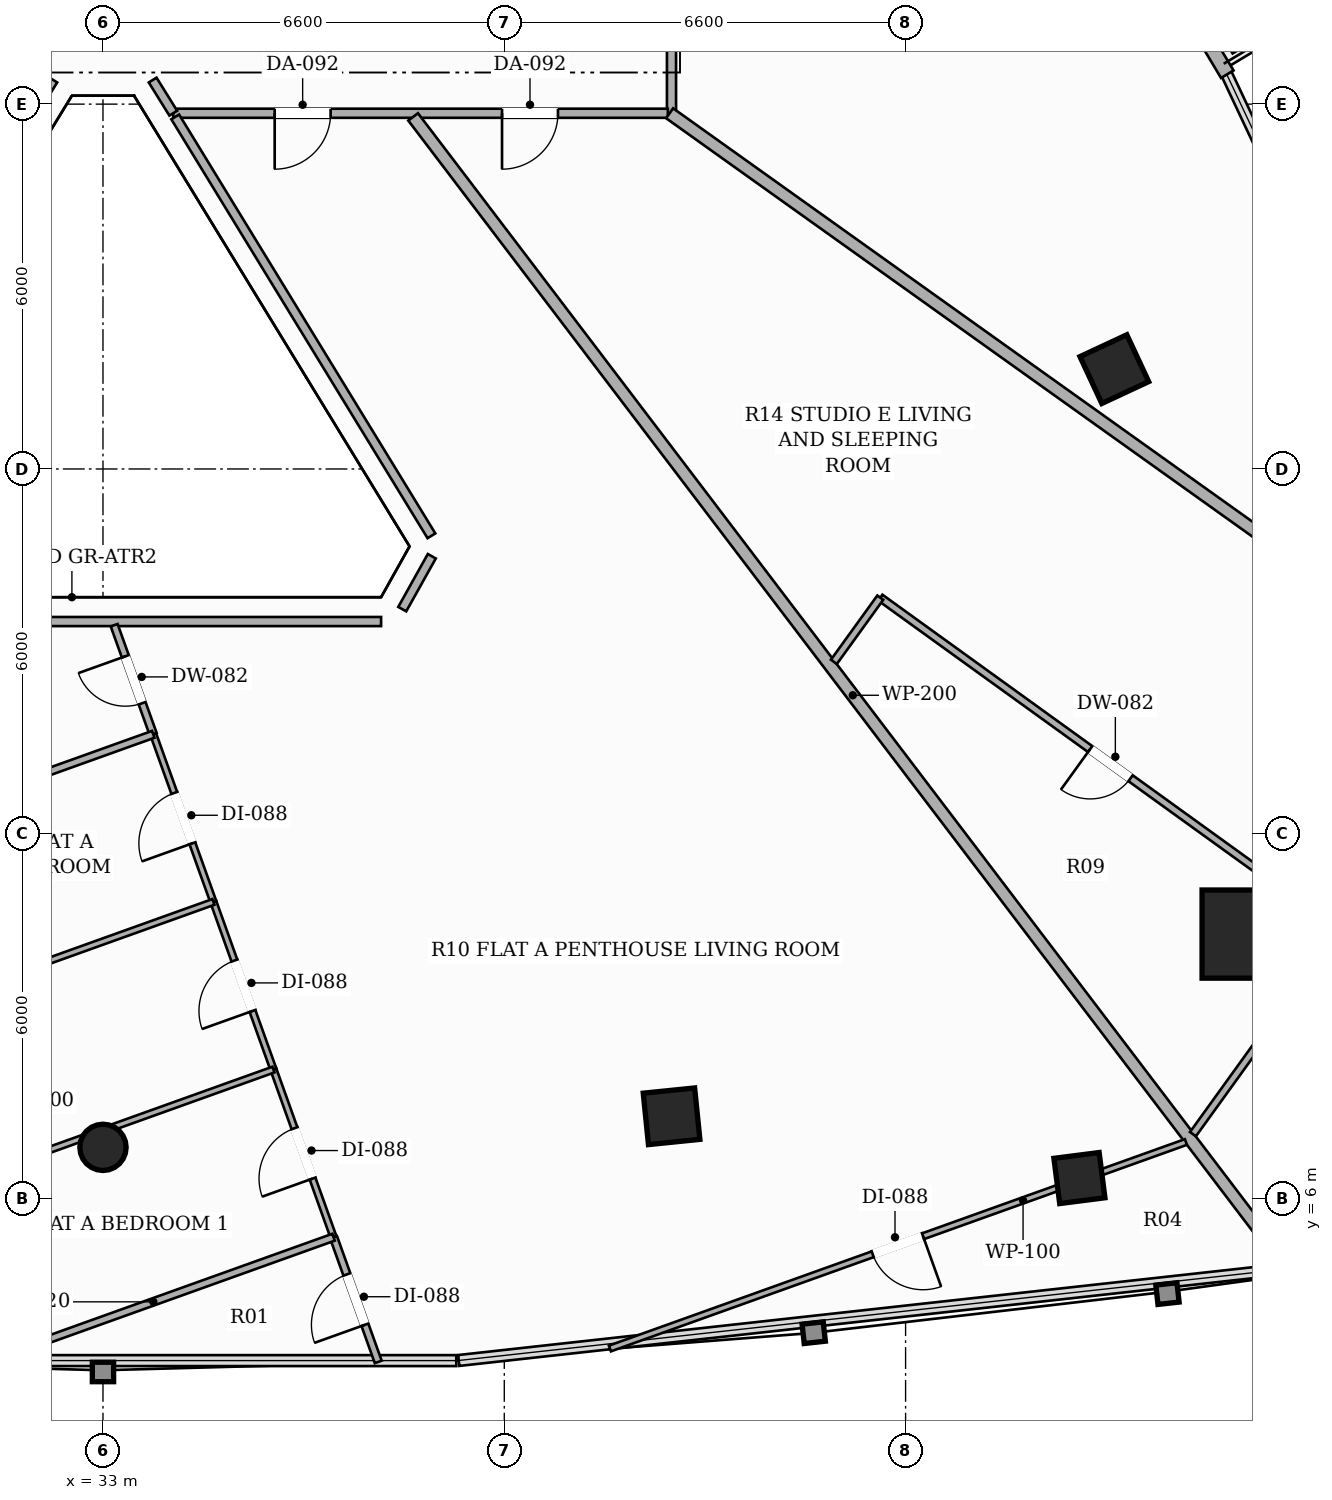
"""IFC4 building model, lengths in metres.
Left out: names, types, materials, properties, quantities, classifications, styles, units other than length and angle.
Written with IfcOpenShell. Run it as: python <this file> out.ifc"""

import sys

from ifc_helpers import new_model, si_unit, direction, frame, frame_2d, origin, origin_2d, place, context, subcontext, project, spatial, rectangle, hollow_rectangle, hollow_circle, extrude, element, fill, save


model = new_model("IFC4")
c1 = context("Model", 3, precision=1e-05, world=origin(), true_north=direction((0.0, 1.0)))
c2 = subcontext(c1, "Body", "Model", "MODEL_VIEW")
j1 = project(units=[si_unit("LENGTHUNIT", "METRE"), si_unit("PLANEANGLEUNIT", "RADIAN")], contexts=[c1])
p1 = place(None, origin())
s1 = spatial("IfcSite", under=j1, at=p1, CompositionType="ELEMENT")
p2 = place(p1, origin())
s2 = spatial("IfcBuilding", under=s1, at=p2, CompositionType="ELEMENT")
p3 = place(p2, frame((0.0, 0.0, 143.0)))
s3 = spatial("IfcBuildingStorey", under=s2, at=p3, CompositionType="ELEMENT", Elevation=143.0)
p4 = place(p3, frame((51.801, 10.351, 0.0), z_axis=(0.0, 0.0, 1.0), x_axis=(1.0, 0.0, 0.0)))
e1 = element("IfcColumn", 1, at=p4, inside=s3, PredefinedType="COLUMN", context=c2, shape_type="SweptSolid", body=[
    extrude(hollow_rectangle(XDim=1.45, YDim=1.45, WallThickness=0.045, at=origin_2d()), origin(), (0.0, 0.0, 1.0), 3.3),
])
p5 = place(p3, frame((33.0, 6.844, 0.0), z_axis=(0.0, 0.0, 1.0), x_axis=(1.0, 0.0, 0.0)))
e2 = element("IfcColumn", 2, at=p5, inside=s3, PredefinedType="COLUMN", context=c2, shape_type="SweptSolid", body=[
    extrude(hollow_circle(Radius=0.381, WallThickness=0.022, at=origin_2d()), origin(), (0.0, 0.0, 1.0), 3.3),
])
for number, where, z_axis, x_axis in (
    (3, (42.351, 7.355, 0.0), (0.0, 0.0, 1.0), (0.995, 0.101, 0.0)),
    (4, (49.633, 19.642, 0.0), (0.0, 0.0, 1.0), (-0.423, 0.906, 0.0)),
):
    element("IfcColumn", number, at=place(p3, frame(where, z_axis=z_axis, x_axis=x_axis)), inside=s3, PredefinedType="COLUMN", context=c2, shape_type="SweptSolid", body=[
        extrude(hollow_rectangle(XDim=0.85, YDim=0.85, WallThickness=0.028, at=origin_2d()), origin(), (0.0, 0.0, 1.0), 3.3),
    ])
p6 = place(p3, frame((49.059, 6.339, 0.0), z_axis=(0.0, 0.0, 1.0), x_axis=(0.99189444259, 0.127064608601, 0.0)))
e5 = element("IfcColumn", 5, at=p6, inside=s3, PredefinedType="COLUMN", context=c2, shape_type="SweptSolid", body=[
    extrude(hollow_rectangle(XDim=0.75, YDim=0.75, WallThickness=0.025, at=origin_2d()), origin(), (0.0, 0.0, 1.0), 3.3),
])
p7 = place(p3, frame((51.491, 24.492, 0.0), z_axis=(0.0, 0.0, 1.0), x_axis=(-0.514364263751, 0.857571807009, 0.0)))
e6 = element("IfcWall", 6, at=p7, inside=s3, PredefinedType="SOLIDWALL", context=c2, shape_type="SweptSolid", body=[
    extrude(rectangle(XDim=11.468, YDim=0.24, at=frame_2d((5.734, 0.0))), origin(), (0.0, 0.0, 1.0), 2.584),
])
p8 = place(p7, frame((8.972, 0.0, 0.0)))
e7 = element("IfcOpeningElement", 7, at=p8, cuts=e6, PredefinedType="OPENING", context=c2, shape_type="SweptSolid", body=[
    extrude(rectangle(XDim=1.8, YDim=2.2, at=frame_2d((0.9, 1.1))), frame((0.0, 0.13, 0.0), z_axis=(0.0, -1.0, 0.0), x_axis=(1.0, 0.0, 0.0)), (0.0, 0.0, 1.0), 0.26),
])
p9 = place(p3, frame((32.183, 24.396, 0.0), z_axis=(0.0, 0.0, 1.0), x_axis=(-0.527674894897, -0.849446411079, 0.0)))
e8 = element("IfcWall", 8, at=p9, inside=s3, PredefinedType="PARTITIONING", context=c2, shape_type="SweptSolid", body=[
    extrude(rectangle(XDim=0.643, YDim=0.15, at=frame_2d((0.321, 0.0))), origin(), (0.0, 0.0, 1.0), 3.02),
])
p10 = place(p3, frame((42.35, 28.34, 0.0), z_axis=(0.0, 0.0, 1.0), x_axis=(0.0, -1.0, 0.0)))
e9 = element("IfcWall", 9, at=p10, inside=s3, PredefinedType="PARTITIONING", context=c2, shape_type="SweptSolid", body=[
    extrude(rectangle(XDim=4.49, YDim=0.15, at=frame_2d((2.245, 0.0))), origin(), (0.0, 0.0, 1.0), 2.681),
])
p11 = place(p10, frame((1.805, 0.0, 0.0)))
e10 = element("IfcOpeningElement", 10, at=p11, cuts=e9, PredefinedType="OPENING", context=c2, shape_type="SweptSolid", body=[
    extrude(rectangle(XDim=0.88, YDim=2.1, at=frame_2d((0.44, 1.05))), frame((0.0, 0.085, 0.0), z_axis=(0.0, -1.0, 0.0), x_axis=(1.0, 0.0, 0.0)), (0.0, 0.0, 1.0), 0.17),
])
p12 = place(p3, frame((42.29, 23.85, 0.0), z_axis=(0.0, 0.0, 1.0), x_axis=(-1.0, 0.0, 0.0)))
e11 = element("IfcWall", 11, at=p12, inside=s3, PredefinedType="PARTITIONING", context=c2, shape_type="SweptSolid", body=[
    extrude(rectangle(XDim=8.134, YDim=0.15, at=frame_2d((4.067, 0.0))), origin(), (0.0, 0.0, 1.0), 2.452),
])
p13 = place(p12, frame((5.546, 0.0, 0.0)))
e12 = element("IfcOpeningElement", 12, at=p13, cuts=e11, PredefinedType="OPENING", context=c2, shape_type="SweptSolid", body=[
    extrude(rectangle(XDim=0.92, YDim=2.15, at=frame_2d((0.46, 1.075))), frame((0.0, 0.085, 0.0), z_axis=(0.0, -1.0, 0.0), x_axis=(1.0, 0.0, 0.0)), (0.0, 0.0, 1.0), 0.17),
])
p14 = place(p12, frame((1.807, 0.0, 0.0)))
e13 = element("IfcOpeningElement", 13, at=p14, cuts=e11, PredefinedType="OPENING", context=c2, shape_type="SweptSolid", body=[
    extrude(rectangle(XDim=0.92, YDim=2.15, at=frame_2d((0.46, 1.075))), frame((0.0, 0.085, 0.0), z_axis=(0.0, -1.0, 0.0), x_axis=(1.0, 0.0, 0.0)), (0.0, 0.0, 1.0), 0.17),
])
p15 = place(p3, frame((34.156, 23.851, 0.0), z_axis=(0.0, 0.0, 1.0), x_axis=(-0.528356729584, 0.849022476913, 0.0)))
e14 = element("IfcWall", 14, at=p15, inside=s3, PredefinedType="PARTITIONING", context=c2, shape_type="SweptSolid", body=[
    extrude(rectangle(XDim=0.642, YDim=0.15, at=frame_2d((0.321, 0.0))), origin(), (0.0, 0.0, 1.0), 3.02),
])
p16 = place(p3, frame((34.188, 23.79, 0.0), z_axis=(0.0, 0.0, 1.0), x_axis=(0.521816809014, -0.853057570057, 0.0)))
e15 = element("IfcWall", 15, at=p16, inside=s3, PredefinedType="PARTITIONING", context=c2, shape_type="SweptSolid", body=[
    extrude(rectangle(XDim=8.076, YDim=0.15, at=frame_2d((4.038, 0.0))), origin(), (0.0, 0.0, 1.0), 2.681),
])
p17 = place(p3, frame((38.408, 16.565, 0.0), z_axis=(0.0, 0.0, 1.0), x_axis=(-0.48761814532, -0.873057010942, 0.0)))
e16 = element("IfcWall", 16, at=p17, inside=s3, PredefinedType="PARTITIONING", context=c2, shape_type="SweptSolid", body=[
    extrude(rectangle(XDim=0.996, YDim=0.15, at=frame_2d((0.498, 0.0))), origin(), (0.0, 0.0, 1.0), 3.02),
])
p18 = place(p3, frame((37.574, 15.491, 0.0), z_axis=(0.0, 0.0, 1.0), x_axis=(-1.0, 0.0, 0.0)))
e17 = element("IfcWall", 17, at=p18, inside=s3, PredefinedType="PARTITIONING", context=c2, shape_type="SweptSolid", body=[
    extrude(rectangle(XDim=9.148, YDim=0.15, at=frame_2d((4.574, 0.0))), origin(), (0.0, 0.0, 1.0), 2.681),
])
p19 = place(p3, frame((38.101, 23.79, 0.0), z_axis=(0.0, 0.0, 1.0), x_axis=(0.605201904092, -0.796072016393, 0.0)))
e18 = element("IfcWall", 18, at=p19, inside=s3, PredefinedType="PARTITIONING", context=c2, shape_type="SweptSolid", body=[
    extrude(rectangle(XDim=23.896, YDim=0.2, at=frame_2d((11.948, 0.0))), origin(), (0.0, 0.0, 1.0), 2.373),
])
p20 = place(p3, frame((56.515, 13.72, 0.0), z_axis=(0.0, 0.0, 1.0), x_axis=(-0.813997291107, 0.580868668522, 0.0)))
e19 = element("IfcWall", 19, at=p20, inside=s3, PredefinedType="PARTITIONING", context=c2, shape_type="SweptSolid", body=[
    extrude(rectangle(XDim=17.44, YDim=0.2, at=frame_2d((8.72, 0.0))), origin(), (0.0, 0.0, 1.0), 2.373),
])
p21 = place(p3, frame((33.827, 13.636, 0.0), z_axis=(0.0, 0.0, 1.0), x_axis=(-0.337163686904, 0.941446041063, 0.0)))
e20 = element("IfcWall", 20, at=p21, inside=s3, PredefinedType="PARTITIONING", context=c2, shape_type="SweptSolid", body=[
    extrude(rectangle(XDim=1.906, YDim=0.12, at=frame_2d((0.953, 0.0))), origin(), (0.0, 0.0, 1.0), 2.681),
])
p22 = place(p21, frame((0.543, 0.0, 0.0)))
e21 = element("IfcOpeningElement", 21, at=p22, cuts=e20, PredefinedType="OPENING", context=c2, shape_type="SweptSolid", body=[
    extrude(rectangle(XDim=0.82, YDim=2.1, at=frame_2d((0.41, 1.05))), frame((0.0, 0.07, 0.0), z_axis=(0.0, -1.0, 0.0), x_axis=(1.0, 0.0, 0.0)), (0.0, 0.0, 1.0), 0.14),
])
p23 = place(p3, frame((37.527, 3.315, 0.0), z_axis=(0.0, 0.0, 1.0), x_axis=(-0.337393850622, 0.9413635799, 0.0)))
e22 = element("IfcWall", 22, at=p23, inside=s3, PredefinedType="PARTITIONING", context=c2, shape_type="SweptSolid", body=[
    extrude(rectangle(XDim=2.179, YDim=0.12, at=frame_2d((1.089, 0.0))), origin(), (0.0, 0.0, 1.0), 3.02),
])
p24 = place(p23, frame((0.649, 0.0, 0.0)))
e23 = element("IfcOpeningElement", 23, at=p24, cuts=e22, PredefinedType="OPENING", context=c2, shape_type="SweptSolid", body=[
    extrude(rectangle(XDim=0.88, YDim=2.1, at=frame_2d((0.44, 1.05))), frame((0.0, 0.07, 0.0), z_axis=(0.0, -1.0, 0.0), x_axis=(1.0, 0.0, 0.0)), (0.0, 0.0, 1.0), 0.14),
])
p25 = place(p3, frame((36.792, 5.366, 0.0), z_axis=(0.0, 0.0, 1.0), x_axis=(-0.33735537207, 0.941377370099, 0.0)))
e24 = element("IfcWall", 24, at=p25, inside=s3, PredefinedType="PARTITIONING", context=c2, shape_type="SweptSolid", body=[
    extrude(rectangle(XDim=2.929, YDim=0.1, at=frame_2d((1.464, 0.0))), origin(), (0.0, 0.0, 1.0), 2.373),
])
p26 = place(p25, frame((1.024, 0.0, 0.0)))
e25 = element("IfcOpeningElement", 25, at=p26, cuts=e24, PredefinedType="OPENING", context=c2, shape_type="SweptSolid", body=[
    extrude(rectangle(XDim=0.88, YDim=2.1, at=frame_2d((0.44, 1.05))), frame((0.0, 0.06, 0.0), z_axis=(0.0, -1.0, 0.0), x_axis=(1.0, 0.0, 0.0)), (0.0, 0.0, 1.0), 0.12),
])
p27 = place(p3, frame((50.81, 6.932, 0.0), z_axis=(0.0, 0.0, 1.0), x_axis=(-0.941340567411, -0.337458050943, 0.0)))
e26 = element("IfcWall", 26, at=p27, inside=s3, PredefinedType="PARTITIONING", context=c2, shape_type="SweptSolid", body=[
    extrude(rectangle(XDim=10.063, YDim=0.1, at=frame_2d((5.032, 0.0))), origin(), (0.0, 0.0, 1.0), 2.373),
])
p28 = place(p27, frame((4.592, 0.0, 0.0)))
e27 = element("IfcOpeningElement", 27, at=p28, cuts=e26, PredefinedType="OPENING", context=c2, shape_type="SweptSolid", body=[
    extrude(rectangle(XDim=0.88, YDim=2.1, at=frame_2d((0.44, 1.05))), frame((0.0, 0.06, 0.0), z_axis=(0.0, -1.0, 0.0), x_axis=(1.0, 0.0, 0.0)), (0.0, 0.0, 1.0), 0.12),
])
p29 = place(p3, frame((35.804, 8.123, 0.0), z_axis=(0.0, 0.0, 1.0), x_axis=(-0.337381847176, 0.941367881965, 0.0)))
e28 = element("IfcWall", 28, at=p29, inside=s3, PredefinedType="PARTITIONING", context=c2, shape_type="SweptSolid", body=[
    extrude(rectangle(XDim=2.928, YDim=0.1, at=frame_2d((1.464, 0.0))), origin(), (0.0, 0.0, 1.0), 3.02),
])
p30 = place(p29, frame((1.024, 0.0, 0.0)))
e29 = element("IfcOpeningElement", 29, at=p30, cuts=e28, PredefinedType="OPENING", context=c2, shape_type="SweptSolid", body=[
    extrude(rectangle(XDim=0.88, YDim=2.1, at=frame_2d((0.44, 1.05))), frame((0.0, 0.06, 0.0), z_axis=(0.0, -1.0, 0.0), x_axis=(1.0, 0.0, 0.0)), (0.0, 0.0, 1.0), 0.12),
])
p31 = place(p3, frame((34.816, 10.88, 0.0), z_axis=(0.0, 0.0, 1.0), x_axis=(-0.337756804272, 0.941233414817, 0.0)))
e30 = element("IfcWall", 30, at=p31, inside=s3, PredefinedType="PARTITIONING", context=c2, shape_type="SweptSolid", body=[
    extrude(rectangle(XDim=2.928, YDim=0.1, at=frame_2d((1.464, 0.0))), origin(), (0.0, 0.0, 1.0), 3.02),
])
p32 = place(p31, frame((1.024, 0.0, 0.0)))
e31 = element("IfcOpeningElement", 31, at=p32, cuts=e30, PredefinedType="OPENING", context=c2, shape_type="SweptSolid", body=[
    extrude(rectangle(XDim=0.88, YDim=2.1, at=frame_2d((0.44, 1.05))), frame((0.0, 0.06, 0.0), z_axis=(0.0, -1.0, 0.0), x_axis=(1.0, 0.0, 0.0)), (0.0, 0.0, 1.0), 0.12),
])
p33 = place(p3, frame((33.827, 13.636, 0.0), z_axis=(0.0, 0.0, 1.0), x_axis=(-0.941307932725, -0.337549071676, 0.0)))
e32 = element("IfcWall", 32, at=p33, inside=s3, PredefinedType="PARTITIONING", context=c2, shape_type="SweptSolid", body=[
    extrude(rectangle(XDim=4.743, YDim=0.12, at=frame_2d((2.372, 0.0))), origin(), (0.0, 0.0, 1.0), 2.681),
])
p34 = place(p3, frame((30.865, 3.241, 0.0), z_axis=(0.0, 0.0, 1.0), x_axis=(0.941328015911, 0.337493061354, 0.0)))
e33 = element("IfcWall", 33, at=p34, inside=s3, PredefinedType="PARTITIONING", context=c2, shape_type="SweptSolid", body=[
    extrude(rectangle(XDim=6.296, YDim=0.12, at=frame_2d((3.148, 0.0))), origin(), (0.0, 0.0, 1.0), 2.579),
])
p35 = place(p3, frame((28.008, 5.328, 0.0), z_axis=(0.0, 0.0, 1.0), x_axis=(0.941323677897, 0.337505160599, 0.0)))
e34 = element("IfcWall", 34, at=p35, inside=s3, PredefinedType="PARTITIONING", context=c2, shape_type="SweptSolid", body=[
    extrude(rectangle(XDim=8.282, YDim=0.1, at=frame_2d((4.141, 0.0))), origin(), (0.0, 0.0, 1.0), 2.373),
])
p36 = place(p3, frame((28.685, 8.682, 0.0), z_axis=(0.0, 0.0, 1.0), x_axis=(0.94133243901, 0.337480724291, 0.0)))
e35 = element("IfcWall", 35, at=p36, inside=s3, PredefinedType="PARTITIONING", context=c2, shape_type="SweptSolid", body=[
    extrude(rectangle(XDim=6.513, YDim=0.1, at=frame_2d((3.256, 0.0))), origin(), (0.0, 0.0, 1.0), 2.681),
])
p37 = place(p3, frame((53.352, 10.424, 0.0), z_axis=(0.0, 0.0, 1.0), x_axis=(-0.810979209295, 0.585074971343, 0.0)))
e36 = element("IfcWall", 36, at=p37, inside=s3, PredefinedType="PARTITIONING", context=c2, shape_type="SweptSolid", body=[
    extrude(rectangle(XDim=9.332, YDim=0.12, at=frame_2d((4.666, 0.0))), origin(), (0.0, 0.0, 1.0), 2.373),
])
p38 = place(p37, frame((4.256, 0.0, 0.0)))
e37 = element("IfcOpeningElement", 37, at=p38, cuts=e36, PredefinedType="OPENING", context=c2, shape_type="SweptSolid", body=[
    extrude(rectangle(XDim=0.82, YDim=2.1, at=frame_2d((0.41, 1.05))), frame((0.0, 0.07, 0.0), z_axis=(0.0, -1.0, 0.0), x_axis=(1.0, 0.0, 0.0)), (0.0, 0.0, 1.0), 0.14),
])
p39 = place(p3, frame((45.784, 15.884, 0.0), z_axis=(0.0, 0.0, 1.0), x_axis=(-0.58557264979, -0.810619930558, 0.0)))
e38 = element("IfcWall", 38, at=p39, inside=s3, PredefinedType="PARTITIONING", context=c2, shape_type="SweptSolid", body=[
    extrude(rectangle(XDim=1.303, YDim=0.12, at=frame_2d((0.651, 0.0))), origin(), (0.0, 0.0, 1.0), 2.681),
])
p40 = place(p3, frame((53.352, 10.424, 0.0), z_axis=(0.0, 0.0, 1.0), x_axis=(-0.585041198475, -0.811003573412, 0.0)))
e39 = element("IfcWall", 39, at=p40, inside=s3, PredefinedType="PARTITIONING", context=c2, shape_type="SweptSolid", body=[
    extrude(rectangle(XDim=4.147, YDim=0.12, at=frame_2d((2.073, 0.0))), origin(), (0.0, 0.0, 1.0), 2.579),
])
p41 = place(p13, origin())
e40 = element("IfcDoor", 40, at=p41, inside=s3, OperationType="SINGLE_SWING_RIGHT", PredefinedType="DOOR", context=c2, shape_type="SweptSolid", body=[
    extrude(rectangle(XDim=0.92, YDim=2.15, at=frame_2d((0.46, 1.075))), frame((0.0, 0.025, 0.0), z_axis=(0.0, -1.0, 0.0), x_axis=(1.0, 0.0, 0.0)), (0.0, 0.0, 1.0), 0.05),
])
fill(e12, e40)
p42 = place(p22, origin())
e41 = element("IfcDoor", 41, at=p42, inside=s3, OperationType="SINGLE_SWING_RIGHT", PredefinedType="DOOR", context=c2, shape_type="SweptSolid", body=[
    extrude(rectangle(XDim=0.82, YDim=2.1, at=frame_2d((0.41, 1.05))), frame((0.0, 0.025, 0.0), z_axis=(0.0, -1.0, 0.0), x_axis=(1.0, 0.0, 0.0)), (0.0, 0.0, 1.0), 0.05),
])
fill(e21, e41)
p43 = place(p24, origin())
e42 = element("IfcDoor", 42, at=p43, inside=s3, OperationType="SINGLE_SWING_LEFT", PredefinedType="DOOR", context=c2, shape_type="SweptSolid", body=[
    extrude(rectangle(XDim=0.88, YDim=2.1, at=frame_2d((0.44, 1.05))), frame((0.0, 0.025, 0.0), z_axis=(0.0, -1.0, 0.0), x_axis=(1.0, 0.0, 0.0)), (0.0, 0.0, 1.0), 0.05),
])
fill(e23, e42)
p44 = place(p26, origin())
e43 = element("IfcDoor", 43, at=p44, inside=s3, OperationType="SINGLE_SWING_LEFT", PredefinedType="DOOR", context=c2, shape_type="SweptSolid", body=[
    extrude(rectangle(XDim=0.88, YDim=2.1, at=frame_2d((0.44, 1.05))), frame((0.0, 0.025, 0.0), z_axis=(0.0, -1.0, 0.0), x_axis=(1.0, 0.0, 0.0)), (0.0, 0.0, 1.0), 0.05),
])
fill(e25, e43)
p45 = place(p28, origin())
e44 = element("IfcDoor", 44, at=p45, inside=s3, OperationType="SINGLE_SWING_LEFT", PredefinedType="DOOR", context=c2, shape_type="SweptSolid", body=[
    extrude(rectangle(XDim=0.88, YDim=2.1, at=frame_2d((0.44, 1.05))), frame((0.0, 0.025, 0.0), z_axis=(0.0, -1.0, 0.0), x_axis=(1.0, 0.0, 0.0)), (0.0, 0.0, 1.0), 0.05),
])
fill(e27, e44)
p46 = place(p30, origin())
e45 = element("IfcDoor", 45, at=p46, inside=s3, OperationType="SINGLE_SWING_LEFT", PredefinedType="DOOR", context=c2, shape_type="SweptSolid", body=[
    extrude(rectangle(XDim=0.88, YDim=2.1, at=frame_2d((0.44, 1.05))), frame((0.0, 0.025, 0.0), z_axis=(0.0, -1.0, 0.0), x_axis=(1.0, 0.0, 0.0)), (0.0, 0.0, 1.0), 0.05),
])
fill(e29, e45)
p47 = place(p32, origin())
e46 = element("IfcDoor", 46, at=p47, inside=s3, OperationType="SINGLE_SWING_LEFT", PredefinedType="DOOR", context=c2, shape_type="SweptSolid", body=[
    extrude(rectangle(XDim=0.88, YDim=2.1, at=frame_2d((0.44, 1.05))), frame((0.0, 0.025, 0.0), z_axis=(0.0, -1.0, 0.0), x_axis=(1.0, 0.0, 0.0)), (0.0, 0.0, 1.0), 0.05),
])
fill(e31, e46)
p48 = place(p14, origin())
e47 = element("IfcDoor", 47, at=p48, inside=s3, OperationType="SINGLE_SWING_RIGHT", PredefinedType="DOOR", context=c2, shape_type="SweptSolid", body=[
    extrude(rectangle(XDim=0.92, YDim=2.15, at=frame_2d((0.46, 1.075))), frame((0.0, 0.025, 0.0), z_axis=(0.0, -1.0, 0.0), x_axis=(1.0, 0.0, 0.0)), (0.0, 0.0, 1.0), 0.05),
])
fill(e13, e47)
p49 = place(p38, origin())
e48 = element("IfcDoor", 48, at=p49, inside=s3, OperationType="SINGLE_SWING_RIGHT", PredefinedType="DOOR", context=c2, shape_type="SweptSolid", body=[
    extrude(rectangle(XDim=0.82, YDim=2.1, at=frame_2d((0.41, 1.05))), frame((0.0, 0.025, 0.0), z_axis=(0.0, -1.0, 0.0), x_axis=(1.0, 0.0, 0.0)), (0.0, 0.0, 1.0), 0.05),
])
fill(e37, e48)
save(model, sys.argv[1])
